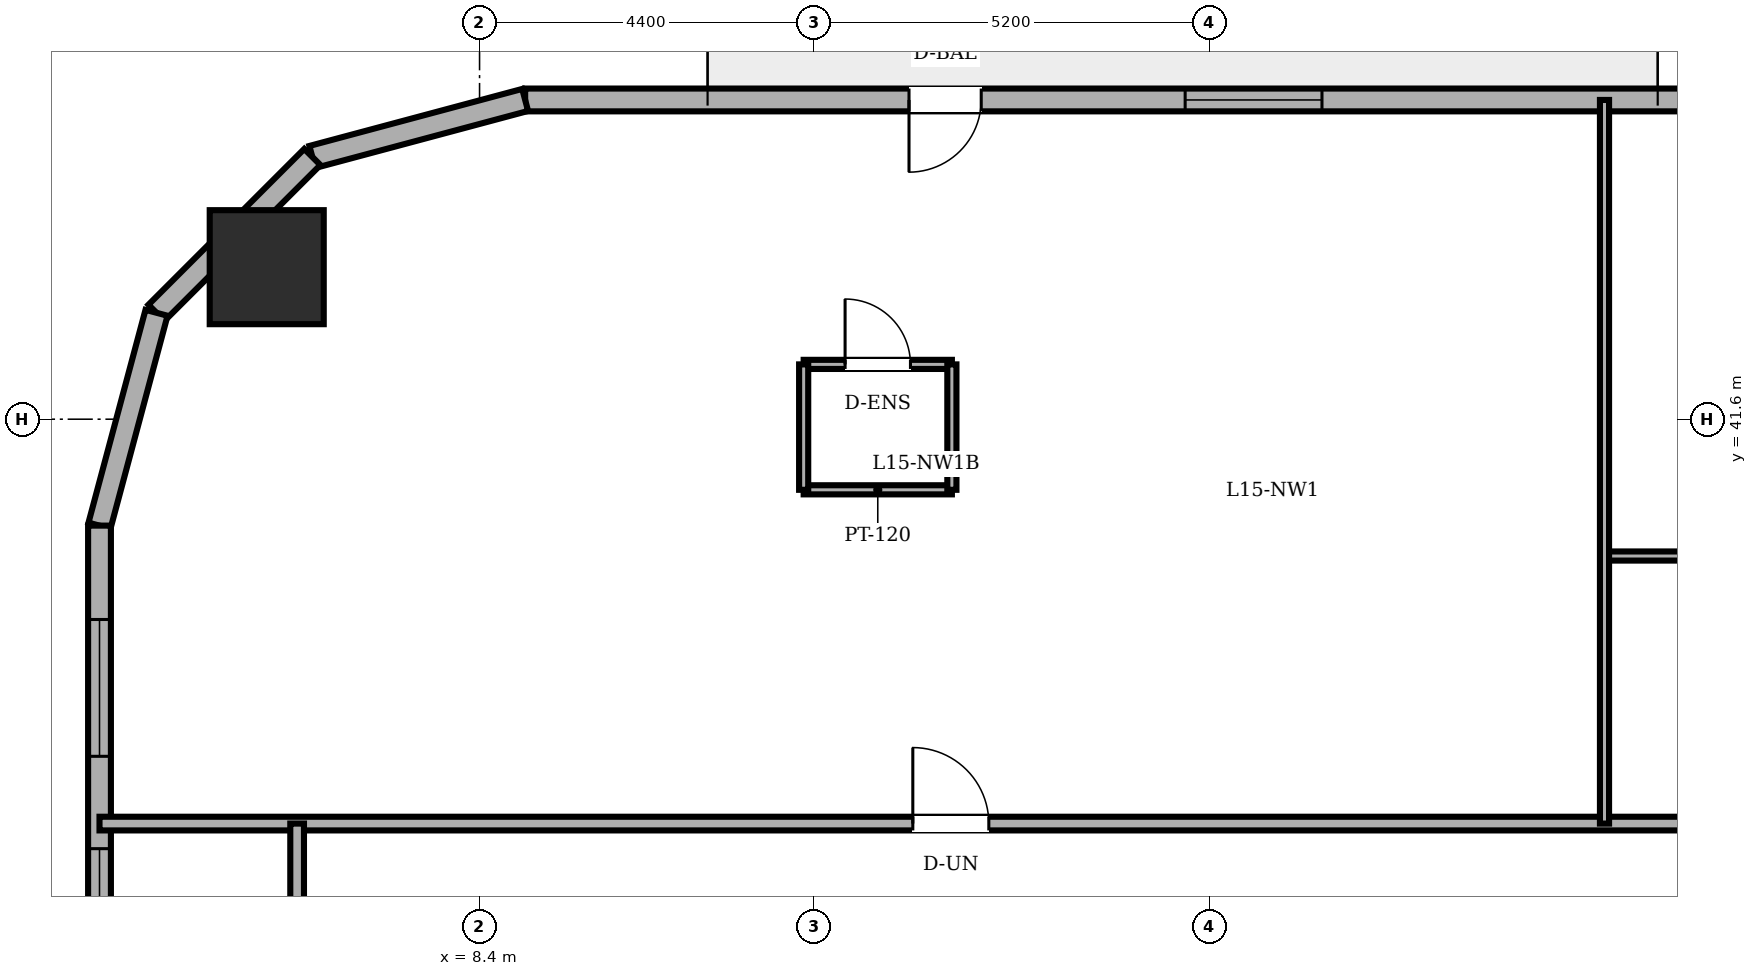
"""IFC4 building model, lengths in metres.
Left out: names, types, materials, properties, quantities, classifications, styles, units other than length and angle.
Written with IfcOpenShell. Run it as: python <this file> out.ifc"""

import sys

from ifc_helpers import new_model, si_unit, direction, frame, frame_2d, origin, origin_2d, place, context, subcontext, project, spatial, rectangle, circle, extrude, element, fill, save


model = new_model("IFC4")
c1 = context("Model", 3, precision=1e-05, world=origin(), true_north=direction((0.0, 1.0)))
c2 = subcontext(c1, "Body", "Model", "MODEL_VIEW")
j1 = project(units=[si_unit("LENGTHUNIT", "METRE"), si_unit("PLANEANGLEUNIT", "RADIAN")], contexts=[c1])
p1 = place(None, origin())
s1 = spatial("IfcSite", under=j1, at=p1, CompositionType="ELEMENT")
p2 = place(p1, origin())
s2 = spatial("IfcBuilding", under=s1, at=p2, CompositionType="ELEMENT")
p3 = place(p2, frame((0.0, 0.0, 57.6)))
s3 = spatial("IfcBuildingStorey", under=s2, at=p3, CompositionType="ELEMENT", Elevation=57.6)
p4 = place(p3, frame((5.6, 43.6, 0.0), z_axis=(0.0, 0.0, 1.0), x_axis=(1.0, 0.0, 0.0)))
e1 = element("IfcColumn", 1, at=p4, inside=s3, PredefinedType="COLUMN", context=c2, shape_type="SweptSolid", body=[
    extrude(circle(Radius=0.75, at=origin_2d()), origin(), (0.0, 0.0, 1.0), 3.6),
])
p5 = place(p3, frame((39.079, 45.8, 0.0), z_axis=(0.0, 0.0, 1.0), x_axis=(-1.0, 0.0, 0.0)))
e2 = element("IfcWall", 2, at=p5, inside=s3, PredefinedType="SOLIDWALL", context=c2, shape_type="SweptSolid", body=[
    extrude(rectangle(XDim=30.079, YDim=0.3, at=frame_2d((15.04, 0.0))), origin(), (0.0, 0.0, 1.0), 3.4),
])
p6 = place(p5, frame((24.079, 0.0, 0.0)))
e3 = element("IfcOpeningElement", 3, at=p6, cuts=e2, PredefinedType="OPENING", context=c2, shape_type="SweptSolid", body=[
    extrude(rectangle(XDim=0.95, YDim=2.2, at=frame_2d((0.475, 1.1))), frame((0.0, 0.16, 0.0), z_axis=(0.0, -1.0, 0.0), x_axis=(1.0, 0.0, 0.0)), (0.0, 0.0, 1.0), 0.32),
])
p7 = place(p5, frame((2.226, 0.0, 0.85)))
e4 = element("IfcOpeningElement", 4, at=p7, cuts=e2, PredefinedType="OPENING", context=c2, shape_type="SweptSolid", body=[
    extrude(rectangle(XDim=1.8, YDim=1.55, at=frame_2d((0.9, 0.775))), frame((0.0, 0.16, 0.0), z_axis=(0.0, -1.0, 0.0), x_axis=(1.0, 0.0, 0.0)), (0.0, 0.0, 1.0), 0.32),
])
p8 = place(p5, frame((5.003, 0.0, 0.85)))
e5 = element("IfcOpeningElement", 5, at=p8, cuts=e2, PredefinedType="OPENING", context=c2, shape_type="SweptSolid", body=[
    extrude(rectangle(XDim=1.8, YDim=1.55, at=frame_2d((0.9, 0.775))), frame((0.0, 0.16, 0.0), z_axis=(0.0, -1.0, 0.0), x_axis=(1.0, 0.0, 0.0)), (0.0, 0.0, 1.0), 0.32),
])
p9 = place(p5, frame((10.179, 0.0, 0.85)))
e6 = element("IfcOpeningElement", 6, at=p9, cuts=e2, PredefinedType="OPENING", context=c2, shape_type="SweptSolid", body=[
    extrude(rectangle(XDim=1.8, YDim=1.55, at=frame_2d((0.9, 0.775))), frame((0.0, 0.16, 0.0), z_axis=(0.0, -1.0, 0.0), x_axis=(1.0, 0.0, 0.0)), (0.0, 0.0, 1.0), 0.32),
])
p10 = place(p5, frame((12.579, 0.0, 0.85)))
e7 = element("IfcOpeningElement", 7, at=p10, cuts=e2, PredefinedType="OPENING", context=c2, shape_type="SweptSolid", body=[
    extrude(rectangle(XDim=1.8, YDim=1.55, at=frame_2d((0.9, 0.775))), frame((0.0, 0.16, 0.0), z_axis=(0.0, -1.0, 0.0), x_axis=(1.0, 0.0, 0.0)), (0.0, 0.0, 1.0), 0.32),
])
p11 = place(p5, frame((19.596, 0.0, 0.85)))
e8 = element("IfcOpeningElement", 8, at=p11, cuts=e2, PredefinedType="OPENING", context=c2, shape_type="SweptSolid", body=[
    extrude(rectangle(XDim=1.8, YDim=1.55, at=frame_2d((0.9, 0.775))), frame((0.0, 0.16, 0.0), z_axis=(0.0, -1.0, 0.0), x_axis=(1.0, 0.0, 0.0)), (0.0, 0.0, 1.0), 0.32),
])
p12 = place(p3, frame((9.0, 45.8, 0.0), z_axis=(0.0, 0.0, 1.0), x_axis=(-0.96594917914, -0.258731875344, 0.0)))
e9 = element("IfcWall", 9, at=p12, inside=s3, PredefinedType="SOLIDWALL", context=c2, shape_type="SweptSolid", body=[
    extrude(rectangle(XDim=2.899, YDim=0.3, at=frame_2d((1.449, 0.0))), origin(), (0.0, 0.0, 1.0), 3.4),
])
p13 = place(p3, frame((6.2, 45.05, 0.0), z_axis=(0.0, 0.0, 1.0), x_axis=(-0.707106781187, -0.707106781187, 0.0)))
e10 = element("IfcWall", 10, at=p13, inside=s3, PredefinedType="SOLIDWALL", context=c2, shape_type="SweptSolid", body=[
    extrude(rectangle(XDim=2.899, YDim=0.3, at=frame_2d((1.45, 0.0))), origin(), (0.0, 0.0, 1.0), 3.4),
])
p14 = place(p3, frame((4.15, 43.0, 0.0), z_axis=(0.0, 0.0, 1.0), x_axis=(-0.258731875344, -0.96594917914, 0.0)))
e11 = element("IfcWall", 11, at=p14, inside=s3, PredefinedType="SOLIDWALL", context=c2, shape_type="SweptSolid", body=[
    extrude(rectangle(XDim=2.899, YDim=0.3, at=frame_2d((1.449, 0.0))), origin(), (0.0, 0.0, 1.0), 3.4),
])
p15 = place(p3, frame((3.4, 40.2, 0.0), z_axis=(0.0, 0.0, 1.0), x_axis=(0.0, -1.0, 0.0)))
e12 = element("IfcWall", 12, at=p15, inside=s3, PredefinedType="SOLIDWALL", context=c2, shape_type="SweptSolid", body=[
    extrude(rectangle(XDim=32.4, YDim=0.3, at=frame_2d((16.2, 0.0))), origin(), (0.0, 0.0, 1.0), 3.4),
])
p16 = place(p15, frame((1.235, 0.0, 0.85)))
e13 = element("IfcOpeningElement", 13, at=p16, cuts=e12, PredefinedType="OPENING", context=c2, shape_type="SweptSolid", body=[
    extrude(rectangle(XDim=1.8, YDim=1.55, at=frame_2d((0.9, 0.775))), frame((0.0, 0.16, 0.0), z_axis=(0.0, -1.0, 0.0), x_axis=(1.0, 0.0, 0.0)), (0.0, 0.0, 1.0), 0.32),
])
p17 = place(p15, frame((4.25, 0.0, 0.85)))
e14 = element("IfcOpeningElement", 14, at=p17, cuts=e12, PredefinedType="OPENING", context=c2, shape_type="SweptSolid", body=[
    extrude(rectangle(XDim=1.8, YDim=1.55, at=frame_2d((0.9, 0.775))), frame((0.0, 0.16, 0.0), z_axis=(0.0, -1.0, 0.0), x_axis=(1.0, 0.0, 0.0)), (0.0, 0.0, 1.0), 0.32),
])
p18 = place(p15, frame((9.253, 0.0, 0.85)))
e15 = element("IfcOpeningElement", 15, at=p18, cuts=e12, PredefinedType="OPENING", context=c2, shape_type="SweptSolid", body=[
    extrude(rectangle(XDim=1.8, YDim=1.55, at=frame_2d((0.9, 0.775))), frame((0.0, 0.16, 0.0), z_axis=(0.0, -1.0, 0.0), x_axis=(1.0, 0.0, 0.0)), (0.0, 0.0, 1.0), 0.32),
])
p19 = place(p15, frame((13.027, 0.0, 0.85)))
e16 = element("IfcOpeningElement", 16, at=p19, cuts=e12, PredefinedType="OPENING", context=c2, shape_type="SweptSolid", body=[
    extrude(rectangle(XDim=1.8, YDim=1.55, at=frame_2d((0.9, 0.775))), frame((0.0, 0.16, 0.0), z_axis=(0.0, -1.0, 0.0), x_axis=(1.0, 0.0, 0.0)), (0.0, 0.0, 1.0), 0.32),
])
p20 = place(p15, frame((19.573, 0.0, 0.85)))
e17 = element("IfcOpeningElement", 17, at=p20, cuts=e12, PredefinedType="OPENING", context=c2, shape_type="SweptSolid", body=[
    extrude(rectangle(XDim=1.8, YDim=1.55, at=frame_2d((0.9, 0.775))), frame((0.0, 0.16, 0.0), z_axis=(0.0, -1.0, 0.0), x_axis=(1.0, 0.0, 0.0)), (0.0, 0.0, 1.0), 0.32),
])
p21 = place(p15, frame((22.347, 0.0, 0.85)))
e18 = element("IfcOpeningElement", 18, at=p21, cuts=e12, PredefinedType="OPENING", context=c2, shape_type="SweptSolid", body=[
    extrude(rectangle(XDim=1.8, YDim=1.55, at=frame_2d((0.9, 0.775))), frame((0.0, 0.16, 0.0), z_axis=(0.0, -1.0, 0.0), x_axis=(1.0, 0.0, 0.0)), (0.0, 0.0, 1.0), 0.32),
])
p22 = place(p15, frame((26.35, 0.0, 0.85)))
e19 = element("IfcOpeningElement", 19, at=p22, cuts=e12, PredefinedType="OPENING", context=c2, shape_type="SweptSolid", body=[
    extrude(rectangle(XDim=1.8, YDim=1.55, at=frame_2d((0.9, 0.775))), frame((0.0, 0.16, 0.0), z_axis=(0.0, -1.0, 0.0), x_axis=(1.0, 0.0, 0.0)), (0.0, 0.0, 1.0), 0.32),
])
p23 = place(p15, frame((29.365, 0.0, 0.85)))
e20 = element("IfcOpeningElement", 20, at=p23, cuts=e12, PredefinedType="OPENING", context=c2, shape_type="SweptSolid", body=[
    extrude(rectangle(XDim=1.8, YDim=1.55, at=frame_2d((0.9, 0.775))), frame((0.0, 0.16, 0.0), z_axis=(0.0, -1.0, 0.0), x_axis=(1.0, 0.0, 0.0)), (0.0, 0.0, 1.0), 0.32),
])
p24 = place(p3, frame((12.664, 42.321, 0.0), z_axis=(0.0, 0.0, 1.0), x_axis=(1.0, 0.0, 0.0)))
e21 = element("IfcWall", 21, at=p24, inside=s3, PredefinedType="PARTITIONING", context=c2, shape_type="SweptSolid", body=[
    extrude(rectangle(XDim=1.95, YDim=0.12, at=frame_2d((0.975, 0.0))), origin(), (0.0, 0.0, 1.0), 3.4),
])
p25 = place(p24, frame((0.545, 0.0, 0.0)))
e22 = element("IfcOpeningElement", 22, at=p25, cuts=e21, PredefinedType="OPENING", context=c2, shape_type="SweptSolid", body=[
    extrude(rectangle(XDim=0.86, YDim=2.1, at=frame_2d((0.43, 1.05))), frame((0.0, 0.07, 0.0), z_axis=(0.0, -1.0, 0.0), x_axis=(1.0, 0.0, 0.0)), (0.0, 0.0, 1.0), 0.14),
])
p26 = place(p3, frame((14.614, 40.671, 0.0), z_axis=(0.0, 0.0, 1.0), x_axis=(-1.0, 0.0, 0.0)))
e23 = element("IfcWall", 23, at=p26, inside=s3, PredefinedType="PARTITIONING", context=c2, shape_type="SweptSolid", body=[
    extrude(rectangle(XDim=1.95, YDim=0.12, at=frame_2d((0.975, 0.0))), origin(), (0.0, 0.0, 1.0), 3.4),
])
for number, where, z_axis, x_axis in (
    (24, (12.664, 42.321, 0.0), (0.0, 0.0, 1.0), (0.0, -1.0, 0.0)),
    (25, (14.614, 40.671, 0.0), (0.0, 0.0, 1.0), (0.0, 1.0, 0.0)),
):
    element("IfcWall", number, at=place(p3, frame(where, z_axis=z_axis, x_axis=x_axis)), inside=s3, PredefinedType="PARTITIONING", context=c2, shape_type="SweptSolid", body=[
        extrude(rectangle(XDim=1.65, YDim=0.12, at=frame_2d((0.825, 0.0))), origin(), (0.0, 0.0, 1.0), 3.4),
    ])
p27 = place(p3, frame((3.4, 36.28, 0.0), z_axis=(0.0, 0.0, 1.0), x_axis=(1.0, 0.0, 0.0)))
e26 = element("IfcWall", 26, at=p27, inside=s3, PredefinedType="PARTITIONING", context=c2, shape_type="SweptSolid", body=[
    extrude(rectangle(XDim=36.45, YDim=0.18, at=frame_2d((18.225, 0.0))), origin(), (0.0, 0.0, 1.0), 3.4),
])
p28 = place(p27, frame((21.05, 0.0, 0.0)))
e27 = element("IfcOpeningElement", 27, at=p28, cuts=e26, PredefinedType="OPENING", context=c2, shape_type="SweptSolid", body=[
    extrude(rectangle(XDim=0.9, YDim=2.1, at=frame_2d((0.45, 1.05))), frame((0.0, 0.1, 0.0), z_axis=(0.0, -1.0, 0.0), x_axis=(1.0, 0.0, 0.0)), (0.0, 0.0, 1.0), 0.2),
])
p29 = place(p27, frame((24.67, 0.0, 0.0)))
e28 = element("IfcOpeningElement", 28, at=p29, cuts=e26, PredefinedType="OPENING", context=c2, shape_type="SweptSolid", body=[
    extrude(rectangle(XDim=0.86, YDim=2.1, at=frame_2d((0.43, 1.05))), frame((0.0, 0.1, 0.0), z_axis=(0.0, -1.0, 0.0), x_axis=(1.0, 0.0, 0.0)), (0.0, 0.0, 1.0), 0.2),
])
p30 = place(p27, frame((10.7, 0.0, 0.0)))
e29 = element("IfcOpeningElement", 29, at=p30, cuts=e26, PredefinedType="OPENING", context=c2, shape_type="SweptSolid", body=[
    extrude(rectangle(XDim=1.0, YDim=2.15, at=frame_2d((0.5, 1.075))), frame((0.0, 0.1, 0.0), z_axis=(0.0, -1.0, 0.0), x_axis=(1.0, 0.0, 0.0)), (0.0, 0.0, 1.0), 0.2),
])
p31 = place(p27, frame((30.965, 0.0, 0.0)))
e30 = element("IfcOpeningElement", 30, at=p31, cuts=e26, PredefinedType="OPENING", context=c2, shape_type="SweptSolid", body=[
    extrude(rectangle(XDim=1.0, YDim=2.15, at=frame_2d((0.5, 1.075))), frame((0.0, 0.1, 0.0), z_axis=(0.0, -1.0, 0.0), x_axis=(1.0, 0.0, 0.0)), (0.0, 0.0, 1.0), 0.2),
])
p32 = place(p3, frame((23.2, 39.8, 0.0), z_axis=(0.0, 0.0, 1.0), x_axis=(1.0, 0.0, 0.0)))
e31 = element("IfcWall", 31, at=p32, inside=s3, PredefinedType="PARTITIONING", context=c2, shape_type="SweptSolid", body=[
    extrude(rectangle(XDim=7.2, YDim=0.12, at=frame_2d((3.6, 0.0))), origin(), (0.0, 0.0, 1.0), 3.4),
])
p33 = place(p3, frame((6.0, 33.82, 0.0), z_axis=(0.0, 0.0, 1.0), x_axis=(0.0, 1.0, 0.0)))
e32 = element("IfcWall", 32, at=p33, inside=s3, PredefinedType="PARTITIONING", context=c2, shape_type="SweptSolid", body=[
    extrude(rectangle(XDim=2.46, YDim=0.18, at=frame_2d((1.23, 0.0))), origin(), (0.0, 0.0, 1.0), 3.4),
])
p34 = place(p3, frame((23.2, 36.28, 0.0), z_axis=(0.0, 0.0, 1.0), x_axis=(0.0, 1.0, 0.0)))
e33 = element("IfcWall", 33, at=p34, inside=s3, PredefinedType="PARTITIONING", context=c2, shape_type="SweptSolid", body=[
    extrude(rectangle(XDim=9.52, YDim=0.12, at=frame_2d((4.76, 0.0))), origin(), (0.0, 0.0, 1.0), 3.4),
])
p35 = place(p6, origin())
e34 = element("IfcDoor", 34, at=p35, inside=s3, OperationType="SINGLE_SWING_RIGHT", PredefinedType="DOOR", context=c2, shape_type="SweptSolid", body=[
    extrude(rectangle(XDim=0.95, YDim=2.2, at=frame_2d((0.475, 1.1))), frame((0.0, 0.025, 0.0), z_axis=(0.0, -1.0, 0.0), x_axis=(1.0, 0.0, 0.0)), (0.0, 0.0, 1.0), 0.05),
])
fill(e3, e34)
p36 = place(p11, origin())
e35 = element("IfcWindow", 35, at=p36, inside=s3, PartitioningType="DOUBLE_PANEL_VERTICAL", PredefinedType="WINDOW", context=c2, shape_type="SweptSolid", body=[
    extrude(rectangle(XDim=1.8, YDim=1.55, at=frame_2d((0.9, 0.775))), frame((0.0, 0.03, 0.0), z_axis=(0.0, -1.0, 0.0), x_axis=(1.0, 0.0, 0.0)), (0.0, 0.0, 1.0), 0.06),
])
fill(e8, e35)
p37 = place(p16, origin())
e36 = element("IfcWindow", 36, at=p37, inside=s3, PartitioningType="DOUBLE_PANEL_VERTICAL", PredefinedType="WINDOW", context=c2, shape_type="SweptSolid", body=[
    extrude(rectangle(XDim=1.8, YDim=1.55, at=frame_2d((0.9, 0.775))), frame((0.0, 0.03, 0.0), z_axis=(0.0, -1.0, 0.0), x_axis=(1.0, 0.0, 0.0)), (0.0, 0.0, 1.0), 0.06),
])
fill(e13, e36)
p38 = place(p17, origin())
e37 = element("IfcWindow", 37, at=p38, inside=s3, PartitioningType="DOUBLE_PANEL_VERTICAL", PredefinedType="WINDOW", context=c2, shape_type="SweptSolid", body=[
    extrude(rectangle(XDim=1.8, YDim=1.55, at=frame_2d((0.9, 0.775))), frame((0.0, 0.03, 0.0), z_axis=(0.0, -1.0, 0.0), x_axis=(1.0, 0.0, 0.0)), (0.0, 0.0, 1.0), 0.06),
])
fill(e14, e37)
p39 = place(p25, origin())
e38 = element("IfcDoor", 38, at=p39, inside=s3, OperationType="SINGLE_SWING_LEFT", PredefinedType="DOOR", context=c2, shape_type="SweptSolid", body=[
    extrude(rectangle(XDim=0.86, YDim=2.1, at=frame_2d((0.43, 1.05))), frame((0.0, 0.025, 0.0), z_axis=(0.0, -1.0, 0.0), x_axis=(1.0, 0.0, 0.0)), (0.0, 0.0, 1.0), 0.05),
])
fill(e22, e38)
p40 = place(p30, origin())
e39 = element("IfcDoor", 39, at=p40, inside=s3, OperationType="SINGLE_SWING_LEFT", PredefinedType="DOOR", context=c2, shape_type="SweptSolid", body=[
    extrude(rectangle(XDim=1.0, YDim=2.15, at=frame_2d((0.5, 1.075))), frame((0.0, 0.025, 0.0), z_axis=(0.0, -1.0, 0.0), x_axis=(1.0, 0.0, 0.0)), (0.0, 0.0, 1.0), 0.05),
])
fill(e29, e39)
save(model, sys.argv[1])
